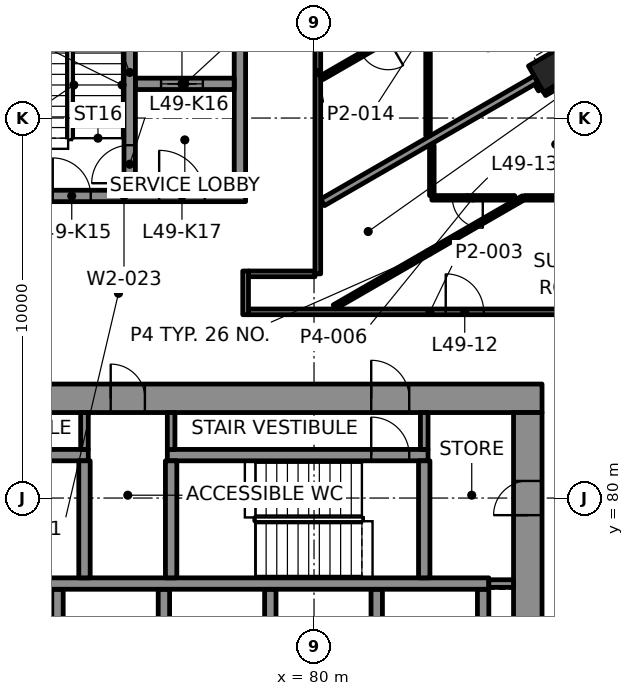
"""IFC4 building model, lengths in metres.
Left out: names, types, materials, properties, quantities, classifications, styles, units other than length and angle.
Written with IfcOpenShell. Run it as: python <this file> out.ifc"""

import sys

from ifc_helpers import new_model, si_unit, direction, frame, frame_2d, origin, origin_2d, place, context, subcontext, project, spatial, rectangle, hollow_rectangle, extrude, element, fill, save


model = new_model("IFC4")
c1 = context("Model", 3, precision=1e-05, world=origin(), true_north=direction((0.0, 1.0)))
c2 = subcontext(c1, "Body", "Model", "MODEL_VIEW")
j1 = project(units=[si_unit("LENGTHUNIT", "METRE"), si_unit("PLANEANGLEUNIT", "RADIAN")], contexts=[c1])
p1 = place(None, origin())
s1 = spatial("IfcSite", under=j1, at=p1, CompositionType="ELEMENT")
p2 = place(p1, origin())
s2 = spatial("IfcBuilding", under=s1, at=p2, CompositionType="ELEMENT")
p3 = place(p2, frame((0.0, 0.0, 210.4)))
s3 = spatial("IfcBuildingStorey", under=s2, at=p3, CompositionType="ELEMENT", Elevation=210.4)
p4 = place(p3, frame((86.276, 91.274, -0.0), z_axis=(0.0, 0.0, 1.0), x_axis=(-0.5, 0.866025403784, 0.0)))
e1 = element("IfcColumn", 1, at=p4, inside=s3, PredefinedType="COLUMN", context=c2, shape_type="SweptSolid", body=[
    extrude(hollow_rectangle(XDim=0.8, YDim=1.0, WallThickness=0.05, at=origin_2d()), origin(), (0.0, 0.0, 1.0), 3.9),
])
p5 = place(p3, frame((64.0, 82.625, 0.0), z_axis=(0.0, 0.0, 1.0), x_axis=(1.0, 0.0, 0.0)))
e2 = element("IfcWall", 2, at=p5, inside=s3, PredefinedType="SHEAR", context=c2, shape_type="SweptSolid", body=[
    extrude(rectangle(XDim=22.0, YDim=0.75, at=frame_2d((11.0, 0.0))), origin(), (0.0, 0.0, 1.0), 3.7),
])
p6 = place(p5, frame((3.695, 0.0, 0.0)))
e3 = element("IfcOpeningElement", 3, at=p6, cuts=e2, PredefinedType="OPENING", context=c2, shape_type="SweptSolid", body=[
    extrude(rectangle(XDim=1.0, YDim=2.1, at=frame_2d((0.5, 1.05))), frame((0.0, 0.385, 0.0), z_axis=(0.0, -1.0, 0.0), x_axis=(1.0, 0.0, 0.0)), (0.0, 0.0, 1.0), 0.77),
])
p7 = place(p5, frame((17.505, 0.0, 0.0)))
e4 = element("IfcOpeningElement", 4, at=p7, cuts=e2, PredefinedType="OPENING", context=c2, shape_type="SweptSolid", body=[
    extrude(rectangle(XDim=1.0, YDim=2.1, at=frame_2d((0.5, 1.05))), frame((0.0, 0.385, 0.0), z_axis=(0.0, -1.0, 0.0), x_axis=(1.0, 0.0, 0.0)), (0.0, 0.0, 1.0), 0.77),
])
p8 = place(p5, frame((10.65, 0.0, 0.0)))
e5 = element("IfcOpeningElement", 5, at=p8, cuts=e2, PredefinedType="OPENING", context=c2, shape_type="SweptSolid", body=[
    extrude(rectangle(XDim=0.9, YDim=2.1, at=frame_2d((0.45, 1.05))), frame((0.0, 0.385, 0.0), z_axis=(0.0, -1.0, 0.0), x_axis=(1.0, 0.0, 0.0)), (0.0, 0.0, 1.0), 0.77),
])
p9 = place(p3, frame((85.625, 67.75, 0.0), z_axis=(0.0, 0.0, 1.0), x_axis=(0.0, 1.0, 0.0)))
e6 = element("IfcWall", 6, at=p9, inside=s3, PredefinedType="SHEAR", context=c2, shape_type="SweptSolid", body=[
    extrude(rectangle(XDim=14.5, YDim=0.75, at=frame_2d((7.25, 0.0))), origin(), (0.0, 0.0, 1.0), 3.7),
])
p10 = place(p9, frame((4.65, 0.0, 0.0)))
e7 = element("IfcOpeningElement", 7, at=p10, cuts=e6, PredefinedType="OPENING", context=c2, shape_type="SweptSolid", body=[
    extrude(rectangle(XDim=1.8, YDim=2.1, at=frame_2d((0.9, 1.05))), frame((0.0, 0.385, 0.0), z_axis=(0.0, -1.0, 0.0), x_axis=(1.0, 0.0, 0.0)), (0.0, 0.0, 1.0), 0.77),
])
p11 = place(p9, frame((11.8, 0.0, 0.0)))
e8 = element("IfcOpeningElement", 8, at=p11, cuts=e6, PredefinedType="OPENING", context=c2, shape_type="SweptSolid", body=[
    extrude(rectangle(XDim=0.9, YDim=2.1, at=frame_2d((0.45, 1.05))), frame((0.0, 0.385, 0.0), z_axis=(0.0, -1.0, 0.0), x_axis=(1.0, 0.0, 0.0)), (0.0, 0.0, 1.0), 0.77),
])
for number, where, z_axis, x_axis in (
    (9, (73.25, 75.0, 0.0), (0.0, 0.0, 1.0), (0.0, 1.0, 0.0)),
    (10, (76.05, 75.0, 0.0), (0.0, 0.0, 1.0), (0.0, 1.0, 0.0)),
    (11, (78.85, 75.0, 0.0), (0.0, 0.0, 1.0), (0.0, 1.0, 0.0)),
    (12, (81.65, 75.0, 0.0), (0.0, 0.0, 1.0), (0.0, 1.0, 0.0)),
    (13, (84.45, 75.0, 0.0), (0.0, 0.0, 1.0), (0.0, 1.0, 0.0)),
):
    element("IfcWall", number, at=place(p3, frame(where, z_axis=z_axis, x_axis=x_axis)), inside=s3, PredefinedType="SHEAR", context=c2, shape_type="SweptSolid", body=[
        extrude(rectangle(XDim=2.6, YDim=0.3, at=frame_2d((1.3, 0.0))), origin(), (0.0, 0.0, 1.0), 3.7),
    ])
p12 = place(p3, frame((67.15, 77.75, 0.0), z_axis=(0.0, 0.0, 1.0), x_axis=(1.0, 0.0, 0.0)))
e14 = element("IfcWall", 14, at=p12, inside=s3, PredefinedType="SHEAR", context=c2, shape_type="SweptSolid", body=[
    extrude(rectangle(XDim=17.45, YDim=0.3, at=frame_2d((8.725, 0.0))), origin(), (0.0, 0.0, 1.0), 3.7),
])
p13 = place(p12, frame((0.545, 0.0, 0.0)))
e15 = element("IfcOpeningElement", 15, at=p13, cuts=e14, PredefinedType="OPENING", context=c2, shape_type="SweptSolid", body=[
    extrude(rectangle(XDim=1.0, YDim=2.1, at=frame_2d((0.5, 1.05))), frame((0.0, 0.16, 0.0), z_axis=(0.0, -1.0, 0.0), x_axis=(1.0, 0.0, 0.0)), (0.0, 0.0, 1.0), 0.32),
])
p14 = place(p3, frame((67.15, 81.13, 0.0), z_axis=(0.0, 0.0, 1.0), x_axis=(1.0, 0.0, 0.0)))
e16 = element("IfcWall", 16, at=p14, inside=s3, PredefinedType="SHEAR", context=c2, shape_type="SweptSolid", body=[
    extrude(rectangle(XDim=6.91, YDim=0.3, at=frame_2d((3.455, 0.0))), origin(), (0.0, 0.0, 1.0), 3.7),
])
p15 = place(p14, frame((0.545, 0.0, 0.0)))
e17 = element("IfcOpeningElement", 17, at=p15, cuts=e16, PredefinedType="OPENING", context=c2, shape_type="SweptSolid", body=[
    extrude(rectangle(XDim=1.0, YDim=2.1, at=frame_2d((0.5, 1.05))), frame((0.0, 0.16, 0.0), z_axis=(0.0, -1.0, 0.0), x_axis=(1.0, 0.0, 0.0)), (0.0, 0.0, 1.0), 0.32),
])
p16 = place(p3, frame((76.14, 81.13, 0.0), z_axis=(0.0, 0.0, 1.0), x_axis=(1.0, 0.0, 0.0)))
e18 = element("IfcWall", 18, at=p16, inside=s3, PredefinedType="SHEAR", context=c2, shape_type="SweptSolid", body=[
    extrude(rectangle(XDim=6.86, YDim=0.3, at=frame_2d((3.43, 0.0))), origin(), (0.0, 0.0, 1.0), 3.7),
])
p17 = place(p16, frame((5.365, 0.0, 0.0)))
e19 = element("IfcOpeningElement", 19, at=p17, cuts=e18, PredefinedType="OPENING", context=c2, shape_type="SweptSolid", body=[
    extrude(rectangle(XDim=1.0, YDim=2.1, at=frame_2d((0.5, 1.05))), frame((0.0, 0.16, 0.0), z_axis=(0.0, -1.0, 0.0), x_axis=(1.0, 0.0, 0.0)), (0.0, 0.0, 1.0), 0.32),
])
for number, where, z_axis, x_axis in (
    (20, (73.96, 77.9, 0.0), (0.0, 0.0, 1.0), (0.0, 1.0, 0.0)),
    (21, (76.24, 77.9, 0.0), (0.0, 0.0, 1.0), (0.0, 1.0, 0.0)),
    (22, (82.9, 77.9, 0.0), (0.0, 0.0, 1.0), (0.0, 1.0, 0.0)),
):
    element("IfcWall", number, at=place(p3, frame(where, z_axis=z_axis, x_axis=x_axis)), inside=s3, PredefinedType="SHEAR", context=c2, shape_type="SweptSolid", body=[
        extrude(rectangle(XDim=3.08, YDim=0.3, at=frame_2d((1.54, 0.0))), origin(), (0.0, 0.0, 1.0), 3.7),
    ])
p18 = place(p3, frame((71.8, 87.95, 0.0), z_axis=(0.0, 0.0, 1.0), x_axis=(1.0, 0.0, 0.0)))
e23 = element("IfcWall", 23, at=p18, inside=s3, PredefinedType="SHEAR", context=c2, shape_type="SweptSolid", body=[
    extrude(rectangle(XDim=6.4, YDim=0.3, at=frame_2d((3.2, 0.0))), origin(), (0.0, 0.0, 1.0), 3.7),
])
p19 = place(p18, frame((1.325, 0.0, 0.0)))
e24 = element("IfcOpeningElement", 24, at=p19, cuts=e23, PredefinedType="OPENING", context=c2, shape_type="SweptSolid", body=[
    extrude(rectangle(XDim=1.0, YDim=2.1, at=frame_2d((0.5, 1.05))), frame((0.0, 0.16, 0.0), z_axis=(0.0, -1.0, 0.0), x_axis=(1.0, 0.0, 0.0)), (0.0, 0.0, 1.0), 0.32),
])
p20 = place(p18, frame((4.125, 0.0, 0.0)))
e25 = element("IfcOpeningElement", 25, at=p20, cuts=e23, PredefinedType="OPENING", context=c2, shape_type="SweptSolid", body=[
    extrude(rectangle(XDim=1.2, YDim=2.1, at=frame_2d((0.6, 1.05))), frame((0.0, 0.16, 0.0), z_axis=(0.0, -1.0, 0.0), x_axis=(1.0, 0.0, 0.0)), (0.0, 0.0, 1.0), 0.32),
])
p21 = place(p3, frame((78.05, 88.1, 0.0), z_axis=(0.0, 0.0, 1.0), x_axis=(0.0, 1.0, 0.0)))
e26 = element("IfcWall", 26, at=p21, inside=s3, PredefinedType="SHEAR", context=c2, shape_type="SweptSolid", body=[
    extrude(rectangle(XDim=6.2, YDim=0.3, at=frame_2d((3.1, 0.0))), origin(), (0.0, 0.0, 1.0), 3.7),
])
p22 = place(p3, frame((75.3, 90.9, 0.0), z_axis=(0.0, 0.0, 1.0), x_axis=(1.0, 0.0, 0.0)))
e27 = element("IfcWall", 27, at=p22, inside=s3, PredefinedType="SHEAR", context=c2, shape_type="SweptSolid", body=[
    extrude(rectangle(XDim=2.6, YDim=0.3, at=frame_2d((1.3, 0.0))), origin(), (0.0, 0.0, 1.0), 3.7),
])
p23 = place(p22, frame((0.675, 0.0, 0.0)))
e28 = element("IfcOpeningElement", 28, at=p23, cuts=e27, PredefinedType="OPENING", context=c2, shape_type="SweptSolid", body=[
    extrude(rectangle(XDim=1.1, YDim=2.1, at=frame_2d((0.55, 1.05))), frame((0.0, 0.16, 0.0), z_axis=(0.0, -1.0, 0.0), x_axis=(1.0, 0.0, 0.0)), (0.0, 0.0, 1.0), 0.32),
])
p24 = place(p3, frame((75.15, 88.1, 0.0), z_axis=(0.0, 0.0, 1.0), x_axis=(0.0, 1.0, 0.0)))
e29 = element("IfcWall", 29, at=p24, inside=s3, PredefinedType="SHEAR", context=c2, shape_type="SweptSolid", body=[
    extrude(rectangle(XDim=6.2, YDim=0.3, at=frame_2d((3.1, 0.0))), origin(), (0.0, 0.0, 1.0), 3.7),
])
p25 = place(p24, frame((0.185, 0.0, 0.0)))
e30 = element("IfcOpeningElement", 30, at=p25, cuts=e29, PredefinedType="OPENING", context=c2, shape_type="SweptSolid", body=[
    extrude(rectangle(XDim=1.0, YDim=2.1, at=frame_2d((0.5, 1.05))), frame((0.0, 0.16, 0.0), z_axis=(0.0, -1.0, 0.0), x_axis=(1.0, 0.0, 0.0)), (0.0, 0.0, 1.0), 0.32),
])
p26 = place(p3, frame((78.275, 84.9, 0.0), z_axis=(0.0, 0.0, 1.0), x_axis=(1.0, 0.0, 0.0)))
e31 = element("IfcWall", 31, at=p26, inside=s3, PredefinedType="PARTITIONING", context=c2, shape_type="SweptSolid", body=[
    extrude(rectangle(XDim=9.55, YDim=0.15, at=frame_2d((4.775, 0.0))), origin(), (0.0, 0.0, 1.0), 3.097),
])
p27 = place(p26, frame((5.191, 0.0, 0.0)))
e32 = element("IfcOpeningElement", 32, at=p27, cuts=e31, PredefinedType="OPENING", context=c2, shape_type="SweptSolid", body=[
    extrude(rectangle(XDim=1.0, YDim=2.1, at=frame_2d((0.5, 1.05))), frame((0.0, 0.085, 0.0), z_axis=(0.0, -1.0, 0.0), x_axis=(1.0, 0.0, 0.0)), (0.0, 0.0, 1.0), 0.17),
])
p28 = place(p3, frame((78.275, 85.9, 0.0), z_axis=(0.0, 0.0, 1.0), x_axis=(1.0, 0.0, 0.0)))
e33 = element("IfcWall", 33, at=p28, inside=s3, PredefinedType="PARTITIONING", context=c2, shape_type="SweptSolid", body=[
    extrude(rectangle(XDim=1.75, YDim=0.15, at=frame_2d((0.875, 0.0))), origin(), (0.0, 0.0, 1.0), 3.097),
])
p29 = place(p3, frame((85.281, 87.9, 0.0), z_axis=(0.0, 0.0, 1.0), x_axis=(-1.0, 0.0, 0.0)))
e34 = element("IfcWall", 34, at=p29, inside=s3, PredefinedType="PARTITIONING", context=c2, shape_type="SweptSolid", body=[
    extrude(rectangle(XDim=2.181, YDim=0.12, at=frame_2d((1.091, 0.0))), origin(), (0.0, 0.0, 1.0), 3.097),
])
p30 = place(p29, frame((0.841, 0.0, 0.0)))
e35 = element("IfcOpeningElement", 35, at=p30, cuts=e34, PredefinedType="OPENING", context=c2, shape_type="SweptSolid", body=[
    extrude(rectangle(XDim=0.8, YDim=2.1, at=frame_2d((0.4, 1.05))), frame((0.0, 0.07, 0.0), z_axis=(0.0, -1.0, 0.0), x_axis=(1.0, 0.0, 0.0)), (0.0, 0.0, 1.0), 0.14),
])
p31 = place(p3, frame((80.534, 85.03, 0.0), z_axis=(0.0, 0.0, 1.0), x_axis=(0.866014884179, 0.500018220049, 0.0)))
e36 = element("IfcWall", 36, at=p31, inside=s3, PredefinedType="PARTITIONING", context=c2, shape_type="SweptSolid", body=[
    extrude(rectangle(XDim=5.74, YDim=0.12, at=frame_2d((2.87, 0.0))), origin(), (0.0, 0.0, 1.0), 3.1),
])
p32 = place(p3, frame((86.043, 90.678, 0.0), z_axis=(0.0, 0.0, 1.0), x_axis=(0.866039090965, 0.499976292358, 0.0)))
e37 = element("IfcWall", 37, at=p32, inside=s3, PredefinedType="PARTITIONING", context=c2, shape_type="SweptSolid", body=[
    extrude(rectangle(XDim=0.999, YDim=0.2, at=frame_2d((0.5, 0.0))), origin(), (0.0, 0.0, 1.0), 3.022),
])
p33 = place(p3, frame((80.227, 87.782, 0.0), z_axis=(0.0, 0.0, 1.0), x_axis=(0.866028841934, 0.499994044904, 0.0)))
e38 = element("IfcWall", 38, at=p33, inside=s3, PredefinedType="PARTITIONING", context=c2, shape_type="SweptSolid", body=[
    extrude(rectangle(XDim=6.484, YDim=0.2, at=frame_2d((3.242, 0.0))), origin(), (0.0, 0.0, 1.0), 3.1),
])
p34 = place(p3, frame((83.0, 92.677, 0.0), z_axis=(0.0, 0.0, 1.0), x_axis=(-0.866029130051, -0.499993545862, 0.0)))
e39 = element("IfcWall", 39, at=p34, inside=s3, PredefinedType="PARTITIONING", context=c2, shape_type="SweptSolid", body=[
    extrude(rectangle(XDim=3.222, YDim=0.12, at=frame_2d((1.611, 0.0))), origin(), (0.0, 0.0, 1.0), 3.1),
])
p35 = place(p34, frame((1.211, 0.0, 0.0)))
e40 = element("IfcOpeningElement", 40, at=p35, cuts=e39, PredefinedType="OPENING", context=c2, shape_type="SweptSolid", body=[
    extrude(rectangle(XDim=0.8, YDim=2.1, at=frame_2d((0.4, 1.05))), frame((0.0, 0.07, 0.0), z_axis=(0.0, -1.0, 0.0), x_axis=(1.0, 0.0, 0.0)), (0.0, 0.0, 1.0), 0.14),
])
p36 = place(p3, frame((83.1, 87.96, 0.0), z_axis=(0.0, 0.0, 1.0), x_axis=(0.0, 1.0, 0.0)))
e41 = element("IfcWall", 41, at=p36, inside=s3, PredefinedType="PARTITIONING", context=c2, shape_type="SweptSolid", body=[
    extrude(rectangle(XDim=1.325, YDim=0.12, at=frame_2d((0.663, 0.0))), origin(), (0.0, 0.0, 1.0), 3.1),
])
p37 = place(p3, frame((83.0, 89.538, 0.0), z_axis=(0.0, 0.0, 1.0), x_axis=(0.0, 1.0, 0.0)))
e42 = element("IfcWall", 42, at=p37, inside=s3, PredefinedType="PARTITIONING", context=c2, shape_type="SweptSolid", body=[
    extrude(rectangle(XDim=3.031, YDim=0.12, at=frame_2d((1.515, 0.0))), origin(), (0.0, 0.0, 1.0), 3.1),
])
p38 = place(p3, frame((80.1, 96.5, 0.0), z_axis=(0.0, 0.0, 1.0), x_axis=(0.0, -1.0, 0.0)))
e43 = element("IfcWall", 43, at=p38, inside=s3, PredefinedType="PARTITIONING", context=c2, shape_type="SweptSolid", body=[
    extrude(rectangle(XDim=10.6, YDim=0.15, at=frame_2d((5.3, 0.0))), origin(), (0.0, 0.0, 1.0), 3.097),
])
p39 = place(p38, frame((1.92, 0.0, 0.0)))
e44 = element("IfcOpeningElement", 44, at=p39, cuts=e43, PredefinedType="OPENING", context=c2, shape_type="SweptSolid", body=[
    extrude(rectangle(XDim=1.0, YDim=2.1, at=frame_2d((0.5, 1.05))), frame((0.0, 0.085, 0.0), z_axis=(0.0, -1.0, 0.0), x_axis=(1.0, 0.0, 0.0)), (0.0, 0.0, 1.0), 0.17),
])
p40 = place(p3, frame((78.2, 84.825, 0.0), z_axis=(0.0, 0.0, 1.0), x_axis=(0.0, 1.0, 0.0)))
e45 = element("IfcWall", 45, at=p40, inside=s3, PredefinedType="PARTITIONING", context=c2, shape_type="SweptSolid", body=[
    extrude(rectangle(XDim=1.15, YDim=0.15, at=frame_2d((0.575, 0.0))), origin(), (0.0, 0.0, 1.0), 3.1),
])
p41 = place(p3, frame((85.993, 90.764, 0.0), z_axis=(0.0, 0.0, 1.0), x_axis=(-0.500359323436, 0.865817848887, 0.0)))
e46 = element("IfcWall", 46, at=p41, inside=s3, PredefinedType="PARTITIONING", context=c2, shape_type="SweptSolid", body=[
    extrude(rectangle(XDim=0.199, YDim=0.2, at=frame_2d((0.1, 0.0))), origin(), (0.0, 0.0, 1.0), 3.1),
])
p42 = place(p3, frame((85.535, 87.9, 0.0), z_axis=(0.0, 0.0, 1.0), x_axis=(1.0, 0.0, 0.0)))
e47 = element("IfcWall", 47, at=p42, inside=s3, PredefinedType="PARTITIONING", context=c2, shape_type="SweptSolid", body=[
    extrude(rectangle(XDim=1.661, YDim=0.12, at=frame_2d((0.831, 0.0))), origin(), (0.0, 0.0, 1.0), 3.1),
])
p43 = place(p3, frame((84.6, 77.75, 0.0), z_axis=(0.0, 0.0, 1.0), x_axis=(1.0, 0.0, 0.0)))
e48 = element("IfcWall", 48, at=p43, inside=s3, PredefinedType="PARTITIONING", context=c2, shape_type="SweptSolid", body=[
    extrude(rectangle(XDim=0.65, YDim=0.2, at=frame_2d((0.325, 0.0))), origin(), (0.0, 0.0, 1.0), 3.7),
])
for number, where, z_axis, x_axis in (
    (49, (73.96, 81.28, 0.0), (0.0, 0.0, 1.0), (0.0, 1.0, 0.0)),
    (50, (76.24, 81.28, 0.0), (0.0, 0.0, 1.0), (0.0, 1.0, 0.0)),
    (51, (82.9, 81.28, 0.0), (0.0, 0.0, 1.0), (0.0, 1.0, 0.0)),
):
    element("IfcWall", number, at=place(p3, frame(where, z_axis=z_axis, x_axis=x_axis)), inside=s3, PredefinedType="PARTITIONING", context=c2, shape_type="SweptSolid", body=[
        extrude(rectangle(XDim=0.97, YDim=0.2, at=frame_2d((0.485, 0.0))), origin(), (0.0, 0.0, 1.0), 3.7),
    ])
p44 = place(p27, origin())
e52 = element("IfcDoor", 52, at=p44, inside=s3, OperationType="SINGLE_SWING_RIGHT", PredefinedType="DOOR", context=c2, shape_type="SweptSolid", body=[
    extrude(rectangle(XDim=1.0, YDim=2.1, at=frame_2d((0.5, 1.05))), frame((0.0, 0.025, 0.0), z_axis=(0.0, -1.0, 0.0), x_axis=(1.0, 0.0, 0.0)), (0.0, 0.0, 1.0), 0.05),
])
fill(e32, e52)
p45 = place(p30, origin())
e53 = element("IfcDoor", 53, at=p45, inside=s3, OperationType="SINGLE_SWING_LEFT", PredefinedType="DOOR", context=c2, shape_type="SweptSolid", body=[
    extrude(rectangle(XDim=0.8, YDim=2.1, at=frame_2d((0.4, 1.05))), frame((0.0, 0.025, 0.0), z_axis=(0.0, -1.0, 0.0), x_axis=(1.0, 0.0, 0.0)), (0.0, 0.0, 1.0), 0.05),
])
fill(e35, e53)
p46 = place(p35, origin())
e54 = element("IfcDoor", 54, at=p46, inside=s3, OperationType="SINGLE_SWING_LEFT", PredefinedType="DOOR", context=c2, shape_type="SweptSolid", body=[
    extrude(rectangle(XDim=0.8, YDim=2.1, at=frame_2d((0.4, 1.05))), frame((0.0, 0.025, 0.0), z_axis=(0.0, -1.0, 0.0), x_axis=(1.0, 0.0, 0.0)), (0.0, 0.0, 1.0), 0.05),
])
fill(e40, e54)
p47 = place(p23, origin())
e55 = element("IfcDoor", 55, at=p47, inside=s3, OperationType="DOUBLE_DOOR_SLIDING", PredefinedType="DOOR", context=c2, shape_type="SweptSolid", body=[
    extrude(rectangle(XDim=1.1, YDim=2.1, at=frame_2d((0.55, 1.05))), frame((0.0, 0.025, 0.0), z_axis=(0.0, -1.0, 0.0), x_axis=(1.0, 0.0, 0.0)), (0.0, 0.0, 1.0), 0.05),
])
fill(e28, e55)
p48 = place(p17, origin())
e56 = element("IfcDoor", 56, at=p48, inside=s3, OperationType="SINGLE_SWING_RIGHT", PredefinedType="DOOR", context=c2, shape_type="SweptSolid", body=[
    extrude(rectangle(XDim=1.0, YDim=2.1, at=frame_2d((0.5, 1.05))), frame((0.0, 0.025, 0.0), z_axis=(0.0, -1.0, 0.0), x_axis=(1.0, 0.0, 0.0)), (0.0, 0.0, 1.0), 0.05),
])
fill(e19, e56)
p49 = place(p7, origin())
e57 = element("IfcDoor", 57, at=p49, inside=s3, OperationType="SINGLE_SWING_LEFT", PredefinedType="DOOR", context=c2, shape_type="SweptSolid", body=[
    extrude(rectangle(XDim=1.0, YDim=2.1, at=frame_2d((0.5, 1.05))), frame((0.0, 0.095, 0.0), z_axis=(0.0, -1.0, 0.0), x_axis=(1.0, 0.0, 0.0)), (0.0, 0.0, 1.0), 0.19),
])
fill(e4, e57)
p50 = place(p19, origin())
e58 = element("IfcDoor", 58, at=p50, inside=s3, OperationType="SINGLE_SWING_RIGHT", PredefinedType="DOOR", context=c2, shape_type="SweptSolid", body=[
    extrude(rectangle(XDim=1.0, YDim=2.1, at=frame_2d((0.5, 1.05))), frame((0.0, 0.025, 0.0), z_axis=(0.0, -1.0, 0.0), x_axis=(1.0, 0.0, 0.0)), (0.0, 0.0, 1.0), 0.05),
])
fill(e24, e58)
p51 = place(p25, origin())
e59 = element("IfcDoor", 59, at=p51, inside=s3, OperationType="SINGLE_SWING_LEFT", PredefinedType="DOOR", context=c2, shape_type="SweptSolid", body=[
    extrude(rectangle(XDim=1.0, YDim=2.1, at=frame_2d((0.5, 1.05))), frame((0.0, 0.025, 0.0), z_axis=(0.0, -1.0, 0.0), x_axis=(1.0, 0.0, 0.0)), (0.0, 0.0, 1.0), 0.05),
])
fill(e30, e59)
p52 = place(p20, origin())
e60 = element("IfcDoor", 60, at=p52, inside=s3, OperationType="SINGLE_SWING_RIGHT", PredefinedType="DOOR", context=c2, shape_type="SweptSolid", body=[
    extrude(rectangle(XDim=1.2, YDim=2.1, at=frame_2d((0.6, 1.05))), frame((0.0, 0.025, 0.0), z_axis=(0.0, -1.0, 0.0), x_axis=(1.0, 0.0, 0.0)), (0.0, 0.0, 1.0), 0.05),
])
fill(e25, e60)
p53 = place(p8, origin())
e61 = element("IfcDoor", 61, at=p53, inside=s3, OperationType="SINGLE_SWING_LEFT", PredefinedType="DOOR", context=c2, shape_type="SweptSolid", body=[
    extrude(rectangle(XDim=0.9, YDim=2.1, at=frame_2d((0.45, 1.05))), frame((0.0, 0.095, 0.0), z_axis=(0.0, -1.0, 0.0), x_axis=(1.0, 0.0, 0.0)), (0.0, 0.0, 1.0), 0.19),
])
fill(e5, e61)
p54 = place(p11, origin())
e62 = element("IfcDoor", 62, at=p54, inside=s3, OperationType="SINGLE_SWING_RIGHT", PredefinedType="DOOR", context=c2, shape_type="SweptSolid", body=[
    extrude(rectangle(XDim=0.9, YDim=2.1, at=frame_2d((0.45, 1.05))), frame((0.0, 0.095, 0.0), z_axis=(0.0, -1.0, 0.0), x_axis=(1.0, 0.0, 0.0)), (0.0, 0.0, 1.0), 0.19),
])
fill(e8, e62)
save(model, sys.argv[1])
